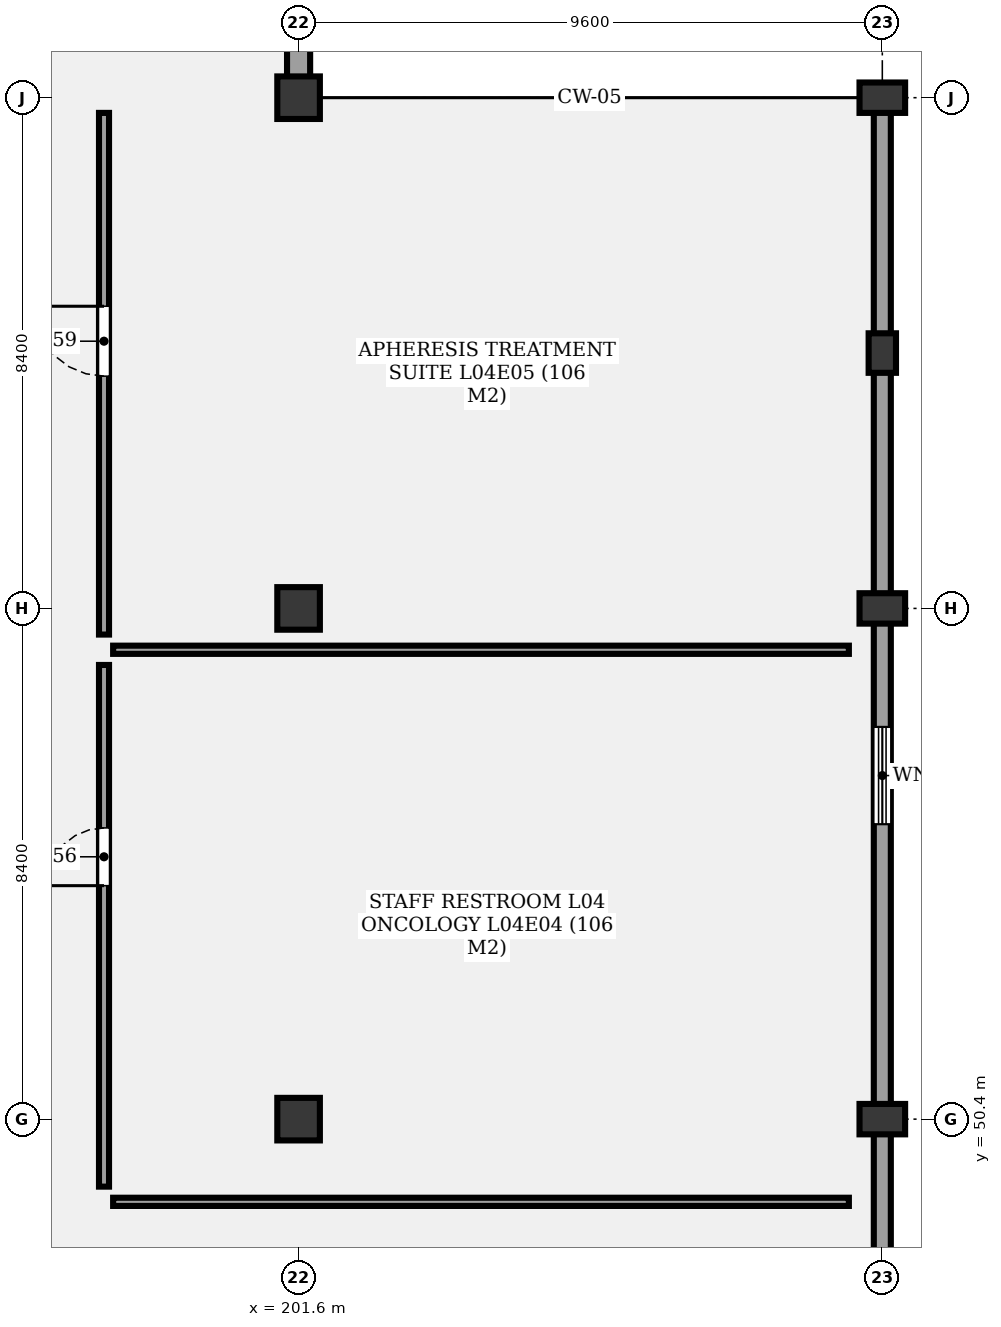
"""IFC4 building model, lengths in metres.
Left out: names, types, materials, properties, quantities, classifications, styles, units other than length and angle.
Written with IfcOpenShell. Run it as: python <this file> out.ifc"""

import sys

from ifc_helpers import new_model, si_unit, direction, frame, frame_2d, origin, origin_2d, place, context, subcontext, project, spatial, rectangle, extrude, element, fill, save


model = new_model("IFC4")
c1 = context("Model", 3, precision=1e-05, world=origin(), true_north=direction((0.0, 1.0)))
c2 = subcontext(c1, "Body", "Model", "MODEL_VIEW")
j1 = project(units=[si_unit("LENGTHUNIT", "METRE"), si_unit("PLANEANGLEUNIT", "RADIAN")], contexts=[c1])
p1 = place(None, origin())
s1 = spatial("IfcSite", under=j1, at=p1, CompositionType="ELEMENT")
p2 = place(p1, origin())
s2 = spatial("IfcBuilding", under=s1, at=p2, CompositionType="ELEMENT")
p3 = place(p2, frame((0.0, 0.0, 17.8)))
s3 = spatial("IfcBuildingStorey", under=s2, at=p3, CompositionType="ELEMENT", Elevation=17.8)
for number, where, z_axis, x_axis in (
    (1, (201.6, 50.4, 0.0), (0.0, 0.0, 1.0), (1.0, 0.0, 0.0)),
    (2, (201.6, 58.8, 0.0), (0.0, 0.0, 1.0), (1.0, 0.0, 0.0)),
    (3, (201.6, 67.2, 0.0), (0.0, 0.0, 1.0), (1.0, 0.0, 0.0)),
):
    element("IfcColumn", number, at=place(p3, frame(where, z_axis=z_axis, x_axis=x_axis)), inside=s3, PredefinedType="COLUMN", context=c2, shape_type="SweptSolid", body=[
        extrude(rectangle(XDim=0.7, YDim=0.7, at=origin_2d()), origin(), (0.0, 0.0, 1.0), 4.2),
    ])
for number, where, z_axis, x_axis in (
    (4, (211.2, 50.4, 0.0), (0.0, 0.0, 1.0), (1.0, 0.0, 0.0)),
    (5, (211.2, 58.8, 0.0), (0.0, 0.0, 1.0), (1.0, 0.0, 0.0)),
    (6, (211.2, 67.2, 0.0), (0.0, 0.0, 1.0), (1.0, 0.0, 0.0)),
):
    element("IfcColumn", number, at=place(p3, frame(where, z_axis=z_axis, x_axis=x_axis)), inside=s3, PredefinedType="COLUMN", context=c2, shape_type="SweptSolid", body=[
        extrude(rectangle(XDim=0.75, YDim=0.5, at=origin_2d()), origin(), (0.0, 0.0, 1.0), 4.2),
    ])
p4 = place(p3, frame((211.2, 63.0, 0.0), z_axis=(0.0, 0.0, 1.0), x_axis=(1.0, 0.0, 0.0)))
e7 = element("IfcColumn", 7, at=p4, inside=s3, PredefinedType="PILASTER", context=c2, shape_type="SweptSolid", body=[
    extrude(rectangle(XDim=0.45, YDim=0.65, at=origin_2d()), origin(), (0.0, 0.0, 1.0), 4.2),
])
p5 = place(p3, frame((201.6, 75.44, 0.0), z_axis=(0.0, 0.0, 1.0), x_axis=(0.0, -1.0, 0.0)))
e8 = element("IfcWall", 8, at=p5, inside=s3, PredefinedType="SOLIDWALL", context=c2, shape_type="SweptSolid", body=[
    extrude(rectangle(XDim=8.08, YDim=0.38, at=frame_2d((4.04, 0.0))), origin(), (0.0, 0.0, 1.0), 3.39),
])
p6 = place(p5, frame((3.39, 0.0, 0.85)))
e9 = element("IfcOpeningElement", 9, at=p6, cuts=e8, PredefinedType="OPENING", context=c2, shape_type="SweptSolid", body=[
    extrude(rectangle(XDim=1.3, YDim=1.6, at=frame_2d((0.65, 0.8))), frame((0.0, 0.2, 0.0), z_axis=(0.0, -1.0, 0.0), x_axis=(1.0, 0.0, 0.0)), (0.0, 0.0, 1.0), 0.4),
])
p7 = place(p3, frame((211.2, 67.04, 0.0), z_axis=(0.0, 0.0, 1.0), x_axis=(0.0, -1.0, 0.0)))
e10 = element("IfcWall", 10, at=p7, inside=s3, PredefinedType="SOLIDWALL", context=c2, shape_type="SweptSolid", body=[
    extrude(rectangle(XDim=33.44, YDim=0.28, at=frame_2d((16.72, 0.0))), origin(), (0.0, 0.0, 1.0), 3.39),
])
p8 = place(p7, frame((10.189, 0.0, 0.85)))
e11 = element("IfcOpeningElement", 11, at=p8, cuts=e10, PredefinedType="OPENING", context=c2, shape_type="SweptSolid", body=[
    extrude(rectangle(XDim=1.6, YDim=1.6, at=frame_2d((0.8, 0.8))), frame((0.0, 0.15, 0.0), z_axis=(0.0, -1.0, 0.0), x_axis=(1.0, 0.0, 0.0)), (0.0, 0.0, 1.0), 0.3),
])
p9 = place(p3, frame((198.4, 49.29, 0.0), z_axis=(0.0, 0.0, 1.0), x_axis=(0.0, 1.0, 0.0)))
e12 = element("IfcWall", 12, at=p9, inside=s3, PredefinedType="PARTITIONING", context=c2, shape_type="SweptSolid", body=[
    extrude(rectangle(XDim=8.58, YDim=0.165, at=frame_2d((4.29, 0.0))), origin(), (0.0, 0.0, 1.0), 3.3),
])
p10 = place(p9, frame((4.95, 0.0, 0.0)))
e13 = element("IfcOpeningElement", 13, at=p10, cuts=e12, PredefinedType="OPENING", context=c2, shape_type="SweptSolid", body=[
    extrude(rectangle(XDim=0.95, YDim=2.1, at=frame_2d((0.475, 1.05))), frame((0.0, 0.093, 0.0), z_axis=(0.0, -1.0, 0.0), x_axis=(1.0, 0.0, 0.0)), (0.0, 0.0, 1.0), 0.185),
])
p11 = place(p3, frame((198.55, 49.04, 0.0), z_axis=(0.0, 0.0, 1.0), x_axis=(1.0, 0.0, 0.0)))
e14 = element("IfcWall", 14, at=p11, inside=s3, PredefinedType="PARTITIONING", context=c2, shape_type="SweptSolid", body=[
    extrude(rectangle(XDim=12.1, YDim=0.135, at=frame_2d((6.05, 0.0))), origin(), (0.0, 0.0, 1.0), 3.3),
])
p12 = place(p3, frame((198.4, 58.37, 0.0), z_axis=(0.0, 0.0, 1.0), x_axis=(0.0, 1.0, 0.0)))
e15 = element("IfcWall", 15, at=p12, inside=s3, PredefinedType="PARTITIONING", context=c2, shape_type="SweptSolid", body=[
    extrude(rectangle(XDim=8.58, YDim=0.165, at=frame_2d((4.29, 0.0))), origin(), (0.0, 0.0, 1.0), 3.3),
])
p13 = place(p12, frame((4.25, 0.0, 0.0)))
e16 = element("IfcOpeningElement", 16, at=p13, cuts=e15, PredefinedType="OPENING", context=c2, shape_type="SweptSolid", body=[
    extrude(rectangle(XDim=1.15, YDim=2.2, at=frame_2d((0.575, 1.1))), frame((0.0, 0.093, 0.0), z_axis=(0.0, -1.0, 0.0), x_axis=(1.0, 0.0, 0.0)), (0.0, 0.0, 1.0), 0.185),
])
p14 = place(p3, frame((198.55, 58.12, 0.0), z_axis=(0.0, 0.0, 1.0), x_axis=(1.0, 0.0, 0.0)))
e17 = element("IfcWall", 17, at=p14, inside=s3, PredefinedType="PARTITIONING", context=c2, shape_type="SweptSolid", body=[
    extrude(rectangle(XDim=12.1, YDim=0.135, at=frame_2d((6.05, 0.0))), origin(), (0.0, 0.0, 1.0), 3.3),
])
p15 = place(p8, origin())
e18 = element("IfcWindow", 18, at=p15, inside=s3, PartitioningType="SINGLE_PANEL", PredefinedType="WINDOW", context=c2, shape_type="SweptSolid", body=[
    extrude(rectangle(XDim=1.6, YDim=1.6, at=frame_2d((0.8, 0.8))), frame((0.0, 0.03, 0.0), z_axis=(0.0, -1.0, 0.0), x_axis=(1.0, 0.0, 0.0)), (0.0, 0.0, 1.0), 0.06),
])
fill(e11, e18)
p16 = place(p10, origin())
e19 = element("IfcDoor", 19, at=p16, inside=s3, OperationType="SINGLE_SWING_LEFT", PredefinedType="DOOR", context=c2, shape_type="SweptSolid", body=[
    extrude(rectangle(XDim=0.95, YDim=2.1, at=frame_2d((0.475, 1.05))), frame((0.0, 0.025, 0.0), z_axis=(0.0, -1.0, 0.0), x_axis=(1.0, 0.0, 0.0)), (0.0, 0.0, 1.0), 0.05),
])
fill(e13, e19)
p17 = place(p13, origin())
e20 = element("IfcDoor", 20, at=p17, inside=s3, OperationType="SINGLE_SWING_RIGHT", PredefinedType="DOOR", context=c2, shape_type="SweptSolid", body=[
    extrude(rectangle(XDim=1.15, YDim=2.2, at=frame_2d((0.575, 1.1))), frame((0.0, 0.025, 0.0), z_axis=(0.0, -1.0, 0.0), x_axis=(1.0, 0.0, 0.0)), (0.0, 0.0, 1.0), 0.05),
])
fill(e16, e20)
save(model, sys.argv[1])
